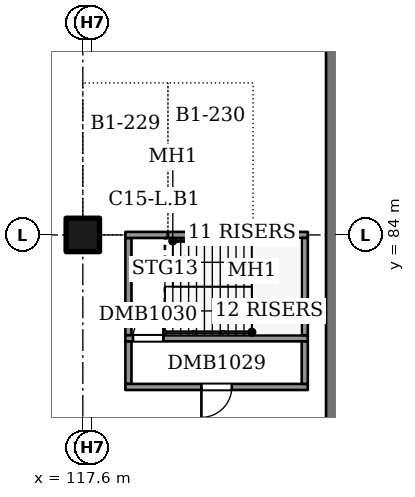
"""IFC4 building model, lengths in metres.
Left out: names, types, materials, properties, quantities, classifications, styles, units other than length and angle.
Written with IfcOpenShell. Run it as: python <this file> out.ifc"""

import sys

from ifc_helpers import new_model, si_unit, direction, frame, frame_2d, origin, origin_2d, place, context, subcontext, project, spatial, rectangle, extrude, element, fill, save


model = new_model("IFC4")
c1 = context("Model", 3, precision=1e-05, world=origin(), true_north=direction((0.0, 1.0)))
c2 = subcontext(c1, "Body", "Model", "MODEL_VIEW")
j1 = project(units=[si_unit("LENGTHUNIT", "METRE"), si_unit("PLANEANGLEUNIT", "RADIAN")], contexts=[c1])
p1 = place(None, origin())
s1 = spatial("IfcSite", under=j1, at=p1, CompositionType="ELEMENT")
p2 = place(p1, origin())
s2 = spatial("IfcBuilding", under=s1, at=p2, CompositionType="ELEMENT")
p3 = place(p2, frame((0.0, 0.0, -4.0)))
s3 = spatial("IfcBuildingStorey", under=s2, at=p3, CompositionType="ELEMENT", Elevation=-4.0)
p4 = place(p3, frame((126.0, 37.4, 0.0), z_axis=(0.0, 0.0, 1.0), x_axis=(0.0, 1.0, 0.0)))
e1 = element("IfcWall", 1, at=p4, inside=s3, PredefinedType="SOLIDWALL", context=c2, shape_type="SweptSolid", body=[
    extrude(rectangle(XDim=63.0, YDim=0.8, at=frame_2d((31.5, 0.0))), origin(), (0.0, 0.0, 1.0), 3.6),
])
p5 = place(p3, frame((117.6, 84.0, 0.0), z_axis=(0.0, 0.0, 1.0), x_axis=(1.0, 0.0, 0.0)))
e2 = element("IfcColumn", 2, at=p5, inside=s3, PredefinedType="COLUMN", context=c2, shape_type="SweptSolid", body=[
    extrude(rectangle(XDim=1.1, YDim=1.1, at=origin_2d()), origin(), (0.0, 0.0, 1.0), 3.6),
])
p6 = place(p3, frame((119.1, 79.1, 0.0), z_axis=(0.0, 0.0, 1.0), x_axis=(0.0, 1.0, 0.0)))
e3 = element("IfcWall", 3, at=p6, inside=s3, PredefinedType="SOLIDWALL", context=c2, shape_type="SweptSolid", body=[
    extrude(rectangle(XDim=1.4, YDim=0.2, at=frame_2d((0.7, 0.0))), origin(), (0.0, 0.0, 1.0), 4.0),
])
p7 = place(p3, frame((119.0, 79.0, 0.0), z_axis=(0.0, 0.0, 1.0), x_axis=(1.0, 0.0, 0.0)))
e4 = element("IfcWall", 4, at=p7, inside=s3, PredefinedType="SOLIDWALL", context=c2, shape_type="SweptSolid", body=[
    extrude(rectangle(XDim=6.0, YDim=0.2, at=frame_2d((3.0, 0.0))), origin(), (0.0, 0.0, 1.0), 4.0),
])
p8 = place(p7, frame((2.5, 0.0, 0.0)))
e5 = element("IfcOpeningElement", 5, at=p8, cuts=e4, PredefinedType="OPENING", context=c2, shape_type="SweptSolid", body=[
    extrude(rectangle(XDim=1.0, YDim=2.1, at=frame_2d((0.5, 1.05))), frame((0.0, 0.11, 0.0), z_axis=(0.0, -1.0, 0.0), x_axis=(1.0, 0.0, 0.0)), (0.0, 0.0, 1.0), 0.22),
])
p9 = place(p3, frame((119.1, 80.7, 0.0), z_axis=(0.0, 0.0, 1.0), x_axis=(0.0, 1.0, 0.0)))
e6 = element("IfcWall", 6, at=p9, inside=s3, PredefinedType="SOLIDWALL", context=c2, shape_type="SweptSolid", body=[
    extrude(rectangle(XDim=3.2, YDim=0.2, at=frame_2d((1.6, 0.0))), origin(), (0.0, 0.0, 1.0), 4.0),
])
p10 = place(p3, frame((119.0, 80.6, 0.0), z_axis=(0.0, 0.0, 1.0), x_axis=(1.0, 0.0, 0.0)))
e7 = element("IfcWall", 7, at=p10, inside=s3, PredefinedType="SOLIDWALL", context=c2, shape_type="SweptSolid", body=[
    extrude(rectangle(XDim=6.0, YDim=0.2, at=frame_2d((3.0, 0.0))), origin(), (0.0, 0.0, 1.0), 4.0),
])
p11 = place(p10, frame((0.25, 0.0, 0.0)))
e8 = element("IfcOpeningElement", 8, at=p11, cuts=e7, PredefinedType="OPENING", context=c2, shape_type="SweptSolid", body=[
    extrude(rectangle(XDim=1.0, YDim=2.1, at=frame_2d((0.5, 1.05))), frame((0.0, 0.11, 0.0), z_axis=(0.0, -1.0, 0.0), x_axis=(1.0, 0.0, 0.0)), (0.0, 0.0, 1.0), 0.22),
])
p12 = place(p3, frame((119.0, 84.0, 0.0), z_axis=(0.0, 0.0, 1.0), x_axis=(1.0, 0.0, 0.0)))
e9 = element("IfcWall", 9, at=p12, inside=s3, PredefinedType="SOLIDWALL", context=c2, shape_type="SweptSolid", body=[
    extrude(rectangle(XDim=1.4, YDim=0.2, at=frame_2d((0.7, 0.0))), origin(), (0.0, 0.0, 1.0), 4.0),
])
p13 = place(p3, frame((120.4, 84.0, 0.0), z_axis=(0.0, 0.0, 1.0), x_axis=(1.0, 0.0, 0.0)))
e10 = element("IfcWall", 10, at=p13, inside=s3, PredefinedType="SOLIDWALL", context=c2, shape_type="SweptSolid", body=[
    extrude(rectangle(XDim=2.8, YDim=0.2, at=frame_2d((1.4, 0.0))), origin(), (0.0, 0.0, 1.0), 4.0),
])
p14 = place(p3, frame((123.2, 84.0, 0.0), z_axis=(0.0, 0.0, 1.0), x_axis=(1.0, 0.0, 0.0)))
e11 = element("IfcWall", 11, at=p14, inside=s3, PredefinedType="SOLIDWALL", context=c2, shape_type="SweptSolid", body=[
    extrude(rectangle(XDim=1.8, YDim=0.2, at=frame_2d((0.9, 0.0))), origin(), (0.0, 0.0, 1.0), 4.0),
])
p15 = place(p3, frame((124.9, 79.1, 0.0), z_axis=(0.0, 0.0, 1.0), x_axis=(0.0, 1.0, 0.0)))
e12 = element("IfcWall", 12, at=p15, inside=s3, PredefinedType="SOLIDWALL", context=c2, shape_type="SweptSolid", body=[
    extrude(rectangle(XDim=1.4, YDim=0.2, at=frame_2d((0.7, 0.0))), origin(), (0.0, 0.0, 1.0), 4.0),
])
p16 = place(p3, frame((124.9, 80.7, 0.0), z_axis=(0.0, 0.0, 1.0), x_axis=(0.0, 1.0, 0.0)))
e13 = element("IfcWall", 13, at=p16, inside=s3, PredefinedType="SOLIDWALL", context=c2, shape_type="SweptSolid", body=[
    extrude(rectangle(XDim=3.2, YDim=0.2, at=frame_2d((1.6, 0.0))), origin(), (0.0, 0.0, 1.0), 4.0),
])
p17 = place(p8, frame((1.0, 0.0, 0.0), z_axis=(0.0, 0.0, 1.0), x_axis=(-1.0, 0.0, 0.0)))
e14 = element("IfcDoor", 14, at=p17, inside=s3, OperationType="SINGLE_SWING_RIGHT", PredefinedType="DOOR", context=c2, shape_type="SweptSolid", body=[
    extrude(rectangle(XDim=1.0, YDim=2.1, at=frame_2d((0.5, 1.05))), frame((0.0, 0.025, 0.0), z_axis=(0.0, -1.0, 0.0), x_axis=(1.0, 0.0, 0.0)), (0.0, 0.0, 1.0), 0.05),
])
fill(e5, e14)
p18 = place(p11, origin())
e15 = element("IfcDoor", 15, at=p18, inside=s3, OperationType="SINGLE_SWING_RIGHT", PredefinedType="DOOR", context=c2, shape_type="SweptSolid", body=[
    extrude(rectangle(XDim=1.0, YDim=2.1, at=frame_2d((0.5, 1.05))), frame((0.0, 0.025, 0.0), z_axis=(0.0, -1.0, 0.0), x_axis=(1.0, 0.0, 0.0)), (0.0, 0.0, 1.0), 0.05),
])
fill(e8, e15)
save(model, sys.argv[1])
